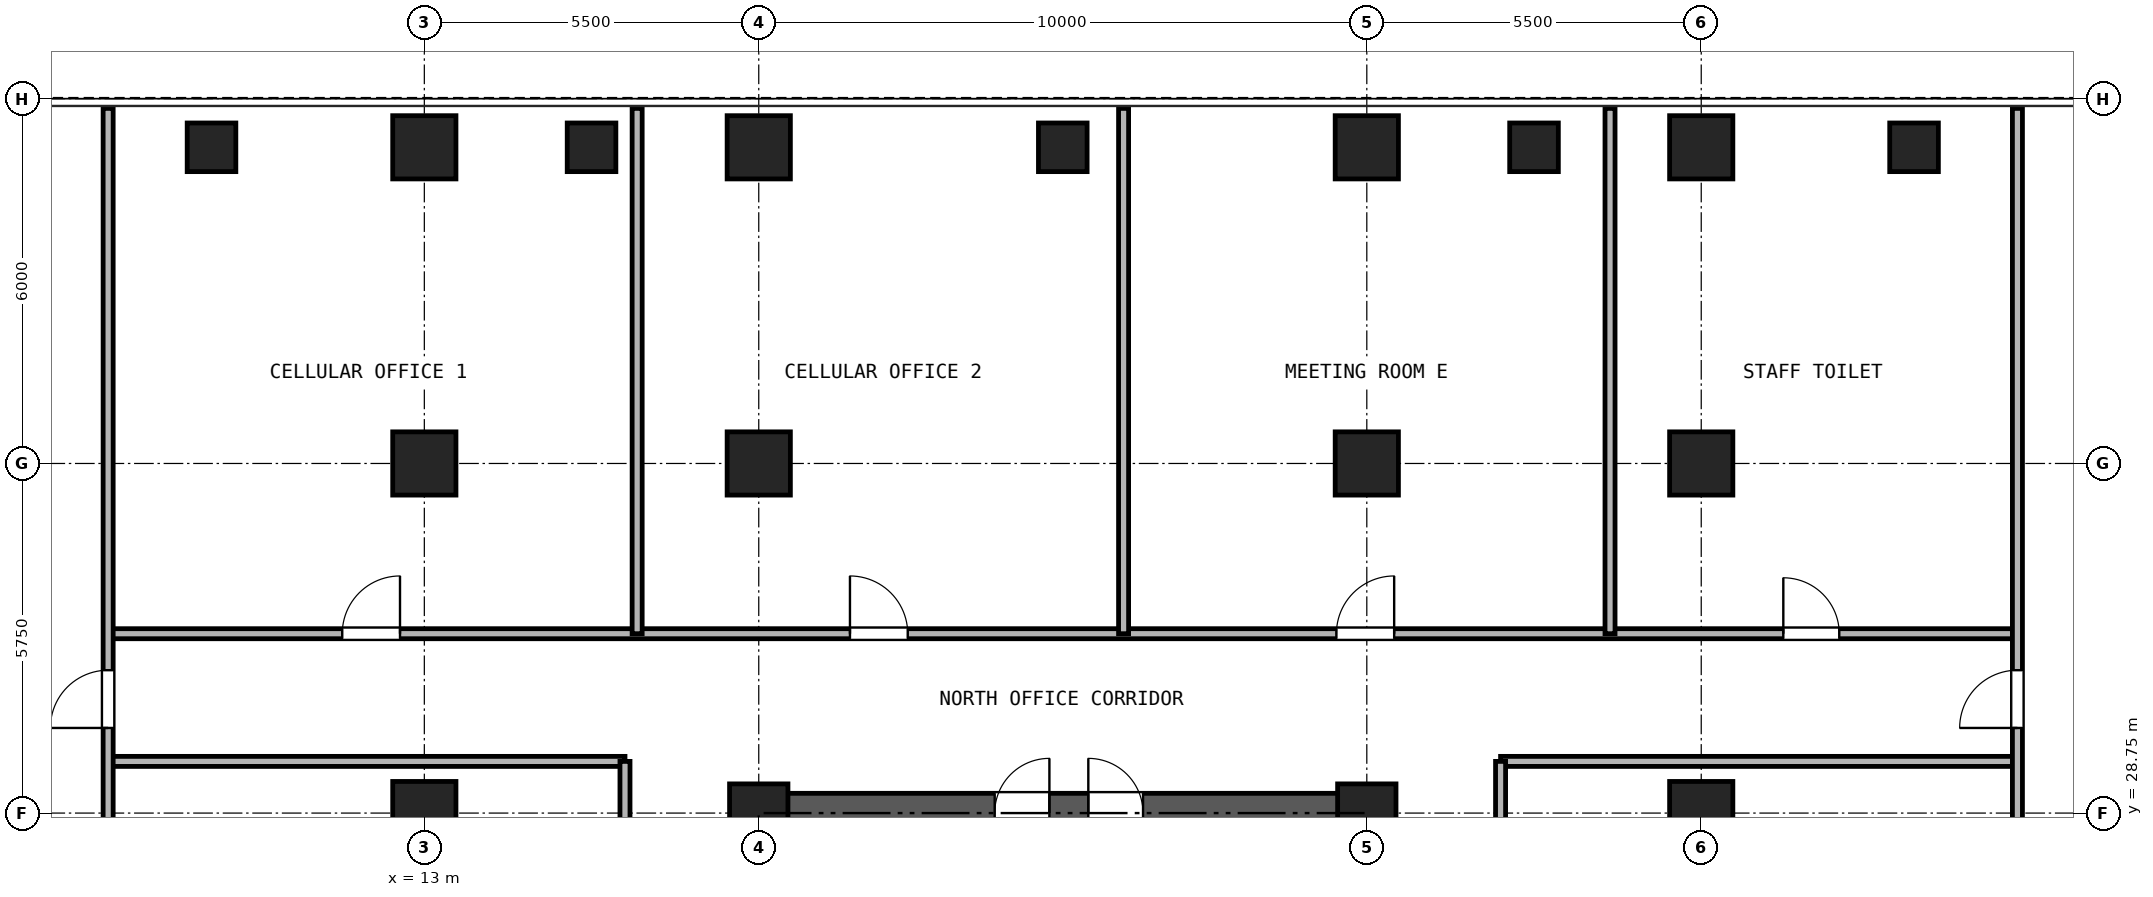
"""IFC4 building model, lengths in metres.
Left out: names, types, materials, properties, quantities, classifications, styles, units other than length and angle.
Written with IfcOpenShell. Run it as: python <this file> out.ifc"""

import sys

from ifc_helpers import new_model, si_unit, direction, frame, frame_2d, origin, origin_2d, place, context, subcontext, project, spatial, rectangle, hollow_rectangle, extrude, source, transform, mapped, element, fill, save


model = new_model("IFC4")
c1 = context("Model", 3, precision=1e-05, world=origin(), true_north=direction((0.0, 1.0)))
c2 = subcontext(c1, "Body", "Model", "MODEL_VIEW")
j1 = project(units=[si_unit("LENGTHUNIT", "METRE"), si_unit("PLANEANGLEUNIT", "RADIAN")], contexts=[c1])
p1 = place(None, origin())
s1 = spatial("IfcSite", under=j1, at=p1, CompositionType="ELEMENT")
p2 = place(p1, origin())
s2 = spatial("IfcBuilding", under=s1, at=p2, CompositionType="ELEMENT")
p3 = place(p2, frame((0.0, 0.0, 69.3)))
s3 = spatial("IfcBuildingStorey", under=s2, at=p3, CompositionType="ELEMENT", Elevation=69.3)
m1 = source(origin(), c2, "Body", "SweptSolid", [
    extrude(hollow_rectangle(XDim=1.04, YDim=1.04, WallThickness=0.065, at=origin_2d()), origin(), (0.0, 0.0, 1.0), 3.32),
])
for number, where, z_axis, x_axis in (
    (1, (13.0, 39.7, 0.0), (0.0, 0.0, 1.0), (1.0, 0.0, 0.0)),
    (2, (18.5, 39.7, 0.0), (0.0, 0.0, 1.0), (1.0, 0.0, 0.0)),
    (3, (28.5, 39.7, 0.0), (0.0, 0.0, 1.0), (1.0, 0.0, 0.0)),
    (4, (34.0, 39.7, 0.0), (0.0, 0.0, 1.0), (1.0, 0.0, 0.0)),
    (5, (13.0, 28.75, 0.0), (0.0, 0.0, 1.0), (1.0, 0.0, 0.0)),
    (6, (13.0, 34.5, 0.0), (0.0, 0.0, 1.0), (1.0, 0.0, 0.0)),
):
    element("IfcColumn", number, at=place(p3, frame(where, z_axis=z_axis, x_axis=x_axis)), inside=s3, PredefinedType="COLUMN", context=c2, shape_type="MappedRepresentation", body=[
        mapped(m1, transform((0.0, 0.0, 0.0), x_axis=(1.0, 0.0, 0.0), y_axis=(0.0, 1.0, 0.0), z_axis=(0.0, 0.0, 1.0), scale=1.0)),
    ])
m2 = source(origin(), c2, "Body", "SweptSolid", [
    extrude(hollow_rectangle(XDim=0.96, YDim=0.96, WallThickness=0.06, at=origin_2d()), origin(), (0.0, 0.0, 1.0), 3.32),
])
p4 = place(p3, frame((18.5, 28.75, 0.0), z_axis=(0.0, 0.0, 1.0), x_axis=(1.0, 0.0, 0.0)))
e7 = element("IfcColumn", 7, at=p4, inside=s3, PredefinedType="COLUMN", context=c2, shape_type="MappedRepresentation", body=[
    mapped(m2, transform((0.0, 0.0, 0.0), x_axis=(1.0, 0.0, 0.0), y_axis=(0.0, 1.0, 0.0), z_axis=(0.0, 0.0, 1.0), scale=1.0)),
])
p5 = place(p3, frame((18.5, 34.5, 0.0), z_axis=(0.0, 0.0, 1.0), x_axis=(1.0, 0.0, 0.0)))
e8 = element("IfcColumn", 8, at=p5, inside=s3, PredefinedType="COLUMN", context=c2, shape_type="MappedRepresentation", body=[
    mapped(m1, transform((0.0, 0.0, 0.0), x_axis=(1.0, 0.0, 0.0), y_axis=(0.0, 1.0, 0.0), z_axis=(0.0, 0.0, 1.0), scale=1.0)),
])
p6 = place(p3, frame((28.5, 28.75, 0.0), z_axis=(0.0, 0.0, 1.0), x_axis=(1.0, 0.0, 0.0)))
e9 = element("IfcColumn", 9, at=p6, inside=s3, PredefinedType="COLUMN", context=c2, shape_type="MappedRepresentation", body=[
    mapped(m2, transform((0.0, 0.0, 0.0), x_axis=(1.0, 0.0, 0.0), y_axis=(0.0, 1.0, 0.0), z_axis=(0.0, 0.0, 1.0), scale=1.0)),
])
for number, where, z_axis, x_axis in (
    (10, (28.5, 34.5, 0.0), (0.0, 0.0, 1.0), (1.0, 0.0, 0.0)),
    (11, (34.0, 28.75, 0.0), (0.0, 0.0, 1.0), (1.0, 0.0, 0.0)),
    (12, (34.0, 34.5, 0.0), (0.0, 0.0, 1.0), (1.0, 0.0, 0.0)),
):
    element("IfcColumn", number, at=place(p3, frame(where, z_axis=z_axis, x_axis=x_axis)), inside=s3, PredefinedType="COLUMN", context=c2, shape_type="MappedRepresentation", body=[
        mapped(m1, transform((0.0, 0.0, 0.0), x_axis=(1.0, 0.0, 0.0), y_axis=(0.0, 1.0, 0.0), z_axis=(0.0, 0.0, 1.0), scale=1.0)),
    ])
m3 = source(origin(), c2, "Body", "SweptSolid", [
    extrude(hollow_rectangle(XDim=0.8, YDim=0.8, WallThickness=0.045, at=origin_2d()), origin(), (0.0, 0.0, 1.0), 3.32),
])
for number, where, z_axis, x_axis in (
    (13, (9.5, 39.7, 0.0), (0.0, 0.0, 1.0), (1.0, 0.0, 0.0)),
    (14, (15.75, 39.7, 0.0), (0.0, 0.0, 1.0), (1.0, 0.0, 0.0)),
    (15, (23.5, 39.7, 0.0), (0.0, 0.0, 1.0), (1.0, 0.0, 0.0)),
    (16, (31.25, 39.7, 0.0), (0.0, 0.0, 1.0), (1.0, 0.0, 0.0)),
    (17, (37.5, 39.7, 0.0), (0.0, 0.0, 1.0), (1.0, 0.0, 0.0)),
):
    element("IfcColumn", number, at=place(p3, frame(where, z_axis=z_axis, x_axis=x_axis)), inside=s3, PredefinedType="COLUMN", context=c2, shape_type="MappedRepresentation", body=[
        mapped(m3, transform((0.0, 0.0, 0.0), x_axis=(1.0, 0.0, 0.0), y_axis=(0.0, 1.0, 0.0), z_axis=(0.0, 0.0, 1.0), scale=1.0)),
    ])
p7 = place(p3, frame((18.175, 28.75, 0.0), z_axis=(0.0, 0.0, 1.0), x_axis=(1.0, 0.0, 0.0)))
e18 = element("IfcWall", 18, at=p7, inside=s3, PredefinedType="SHEAR", context=c2, shape_type="SweptSolid", body=[
    extrude(rectangle(XDim=10.65, YDim=0.65, at=frame_2d((5.325, 0.0))), origin(), (0.0, 0.0, 1.0), 3.32),
])
p8 = place(p7, frame((4.205, 0.0, 0.0)))
e19 = element("IfcOpeningElement", 19, at=p8, cuts=e18, PredefinedType="OPENING", context=c2, shape_type="SweptSolid", body=[
    extrude(rectangle(XDim=0.9, YDim=2.05, at=frame_2d((0.45, 1.025))), frame((0.0, 0.335, 0.0), z_axis=(0.0, -1.0, 0.0), x_axis=(1.0, 0.0, 0.0)), (0.0, 0.0, 1.0), 0.67),
])
p9 = place(p7, frame((5.745, 0.0, 0.0)))
e20 = element("IfcOpeningElement", 20, at=p9, cuts=e18, PredefinedType="OPENING", context=c2, shape_type="SweptSolid", body=[
    extrude(rectangle(XDim=0.9, YDim=2.05, at=frame_2d((0.45, 1.025))), frame((0.0, 0.335, 0.0), z_axis=(0.0, -1.0, 0.0), x_axis=(1.0, 0.0, 0.0)), (0.0, 0.0, 1.0), 0.67),
])
p10 = place(p3, frame((7.8, 31.7, 0.0), z_axis=(0.0, 0.0, 1.0), x_axis=(1.0, 0.0, 0.0)))
e21 = element("IfcWall", 21, at=p10, inside=s3, PredefinedType="PARTITIONING", context=c2, shape_type="SweptSolid", body=[
    extrude(rectangle(XDim=31.4, YDim=0.165, at=frame_2d((15.7, 0.0))), origin(), (0.0, 0.0, 1.0), 2.898),
])
p11 = place(p10, frame((3.85, 0.0, 0.0)))
e22 = element("IfcOpeningElement", 22, at=p11, cuts=e21, PredefinedType="OPENING", context=c2, shape_type="SweptSolid", body=[
    extrude(rectangle(XDim=0.95, YDim=2.15, at=frame_2d((0.475, 1.075))), frame((0.0, 0.093, 0.0), z_axis=(0.0, -1.0, 0.0), x_axis=(1.0, 0.0, 0.0)), (0.0, 0.0, 1.0), 0.185),
])
p12 = place(p10, frame((12.2, 0.0, 0.0)))
e23 = element("IfcOpeningElement", 23, at=p12, cuts=e21, PredefinedType="OPENING", context=c2, shape_type="SweptSolid", body=[
    extrude(rectangle(XDim=0.95, YDim=2.15, at=frame_2d((0.475, 1.075))), frame((0.0, 0.093, 0.0), z_axis=(0.0, -1.0, 0.0), x_axis=(1.0, 0.0, 0.0)), (0.0, 0.0, 1.0), 0.185),
])
p13 = place(p10, frame((20.2, 0.0, 0.0)))
e24 = element("IfcOpeningElement", 24, at=p13, cuts=e21, PredefinedType="OPENING", context=c2, shape_type="SweptSolid", body=[
    extrude(rectangle(XDim=0.95, YDim=2.15, at=frame_2d((0.475, 1.075))), frame((0.0, 0.093, 0.0), z_axis=(0.0, -1.0, 0.0), x_axis=(1.0, 0.0, 0.0)), (0.0, 0.0, 1.0), 0.185),
])
p14 = place(p10, frame((27.55, 0.0, 0.0)))
e25 = element("IfcOpeningElement", 25, at=p14, cuts=e21, PredefinedType="OPENING", context=c2, shape_type="SweptSolid", body=[
    extrude(rectangle(XDim=0.92, YDim=2.1, at=frame_2d((0.46, 1.05))), frame((0.0, 0.093, 0.0), z_axis=(0.0, -1.0, 0.0), x_axis=(1.0, 0.0, 0.0)), (0.0, 0.0, 1.0), 0.185),
])
for number, where, z_axis, x_axis in (
    (26, (7.8, 29.6, 0.0), (0.0, 0.0, 1.0), (1.0, 0.0, 0.0)),
    (27, (30.7, 29.6, 0.0), (0.0, 0.0, 1.0), (1.0, 0.0, 0.0)),
):
    element("IfcWall", number, at=place(p3, frame(where, z_axis=z_axis, x_axis=x_axis)), inside=s3, PredefinedType="PARTITIONING", context=c2, shape_type="SweptSolid", body=[
        extrude(rectangle(XDim=8.5, YDim=0.165, at=frame_2d((4.25, 0.0))), origin(), (0.0, 0.0, 1.0), 3.32),
    ])
p15 = place(p3, frame((16.3, 10.7, 0.0), z_axis=(0.0, 0.0, 1.0), x_axis=(0.0, 1.0, 0.0)))
e28 = element("IfcWall", 28, at=p15, inside=s3, PredefinedType="PARTITIONING", context=c2, shape_type="SweptSolid", body=[
    extrude(rectangle(XDim=18.9, YDim=0.165, at=frame_2d((9.45, 0.0))), origin(), (0.0, 0.0, 1.0), 3.32),
])
p16 = place(p15, frame((5.611, 0.0, 0.0)))
e29 = element("IfcOpeningElement", 29, at=p16, cuts=e28, PredefinedType="OPENING", context=c2, shape_type="SweptSolid", body=[
    extrude(rectangle(XDim=0.95, YDim=2.15, at=frame_2d((0.475, 1.075))), frame((0.0, 0.093, 0.0), z_axis=(0.0, -1.0, 0.0), x_axis=(1.0, 0.0, 0.0)), (0.0, 0.0, 1.0), 0.185),
])
p17 = place(p15, frame((15.061, 0.0, 0.0)))
e30 = element("IfcOpeningElement", 30, at=p17, cuts=e28, PredefinedType="OPENING", context=c2, shape_type="SweptSolid", body=[
    extrude(rectangle(XDim=0.95, YDim=2.15, at=frame_2d((0.475, 1.075))), frame((0.0, 0.093, 0.0), z_axis=(0.0, -1.0, 0.0), x_axis=(1.0, 0.0, 0.0)), (0.0, 0.0, 1.0), 0.185),
])
p18 = place(p3, frame((30.7, 10.7, 0.0), z_axis=(0.0, 0.0, 1.0), x_axis=(0.0, 1.0, 0.0)))
e31 = element("IfcWall", 31, at=p18, inside=s3, PredefinedType="PARTITIONING", context=c2, shape_type="SweptSolid", body=[
    extrude(rectangle(XDim=18.9, YDim=0.165, at=frame_2d((9.45, 0.0))), origin(), (0.0, 0.0, 1.0), 3.32),
])
p19 = place(p18, frame((8.95, 0.0, 0.0)))
e32 = element("IfcOpeningElement", 32, at=p19, cuts=e31, PredefinedType="OPENING", context=c2, shape_type="SweptSolid", body=[
    extrude(rectangle(XDim=0.95, YDim=2.15, at=frame_2d((0.475, 1.075))), frame((0.0, 0.093, 0.0), z_axis=(0.0, -1.0, 0.0), x_axis=(1.0, 0.0, 0.0)), (0.0, 0.0, 1.0), 0.185),
])
p20 = place(p3, frame((7.8, 0.16, 0.0), z_axis=(0.0, 0.0, 1.0), x_axis=(0.0, 1.0, 0.0)))
e33 = element("IfcWall", 33, at=p20, inside=s3, PredefinedType="PARTITIONING", context=c2, shape_type="SweptSolid", body=[
    extrude(rectangle(XDim=40.18, YDim=0.165, at=frame_2d((20.09, 0.0))), origin(), (0.0, 0.0, 1.0), 3.32),
])
p21 = place(p20, frame((8.99, 0.0, 0.0)))
e34 = element("IfcOpeningElement", 34, at=p21, cuts=e33, PredefinedType="OPENING", context=c2, shape_type="SweptSolid", body=[
    extrude(rectangle(XDim=0.95, YDim=2.15, at=frame_2d((0.475, 1.075))), frame((0.0, 0.093, 0.0), z_axis=(0.0, -1.0, 0.0), x_axis=(1.0, 0.0, 0.0)), (0.0, 0.0, 1.0), 0.185),
])
p22 = place(p20, frame((29.99, 0.0, 0.0)))
e35 = element("IfcOpeningElement", 35, at=p22, cuts=e33, PredefinedType="OPENING", context=c2, shape_type="SweptSolid", body=[
    extrude(rectangle(XDim=0.95, YDim=2.15, at=frame_2d((0.475, 1.075))), frame((0.0, 0.093, 0.0), z_axis=(0.0, -1.0, 0.0), x_axis=(1.0, 0.0, 0.0)), (0.0, 0.0, 1.0), 0.185),
])
p23 = place(p3, frame((39.2, 0.16, 0.0), z_axis=(0.0, 0.0, 1.0), x_axis=(0.0, 1.0, 0.0)))
e36 = element("IfcWall", 36, at=p23, inside=s3, PredefinedType="PARTITIONING", context=c2, shape_type="SweptSolid", body=[
    extrude(rectangle(XDim=40.18, YDim=0.165, at=frame_2d((20.09, 0.0))), origin(), (0.0, 0.0, 1.0), 3.32),
])
p24 = place(p23, frame((8.99, 0.0, 0.0)))
e37 = element("IfcOpeningElement", 37, at=p24, cuts=e36, PredefinedType="OPENING", context=c2, shape_type="SweptSolid", body=[
    extrude(rectangle(XDim=0.95, YDim=2.15, at=frame_2d((0.475, 1.075))), frame((0.0, 0.093, 0.0), z_axis=(0.0, -1.0, 0.0), x_axis=(1.0, 0.0, 0.0)), (0.0, 0.0, 1.0), 0.185),
])
p25 = place(p23, frame((29.99, 0.0, 0.0)))
e38 = element("IfcOpeningElement", 38, at=p25, cuts=e36, PredefinedType="OPENING", context=c2, shape_type="SweptSolid", body=[
    extrude(rectangle(XDim=0.95, YDim=2.15, at=frame_2d((0.475, 1.075))), frame((0.0, 0.093, 0.0), z_axis=(0.0, -1.0, 0.0), x_axis=(1.0, 0.0, 0.0)), (0.0, 0.0, 1.0), 0.185),
])
for number, where, z_axis, x_axis in (
    (39, (16.5, 31.7, 0.0), (0.0, 0.0, 1.0), (0.0, 1.0, 0.0)),
    (40, (24.5, 31.7, 0.0), (0.0, 0.0, 1.0), (0.0, 1.0, 0.0)),
    (41, (32.5, 31.7, 0.0), (0.0, 0.0, 1.0), (0.0, 1.0, 0.0)),
):
    element("IfcWall", number, at=place(p3, frame(where, z_axis=z_axis, x_axis=x_axis)), inside=s3, PredefinedType="PARTITIONING", context=c2, shape_type="SweptSolid", body=[
        extrude(rectangle(XDim=8.64, YDim=0.165, at=frame_2d((4.32, 0.0))), origin(), (0.0, 0.0, 1.0), 3.32),
    ])
p26 = place(p8, origin())
e42 = element("IfcDoor", 42, at=p26, inside=s3, OperationType="SINGLE_SWING_RIGHT", PredefinedType="DOOR", context=c2, shape_type="SweptSolid", body=[
    extrude(rectangle(XDim=0.9, YDim=2.05, at=frame_2d((0.45, 1.025))), frame((0.0, 0.025, 0.0), z_axis=(0.0, -1.0, 0.0), x_axis=(1.0, 0.0, 0.0)), (0.0, 0.0, 1.0), 0.05),
])
fill(e19, e42)
p27 = place(p9, origin())
e43 = element("IfcDoor", 43, at=p27, inside=s3, OperationType="SINGLE_SWING_LEFT", PredefinedType="DOOR", context=c2, shape_type="SweptSolid", body=[
    extrude(rectangle(XDim=0.9, YDim=2.05, at=frame_2d((0.45, 1.025))), frame((0.0, 0.025, 0.0), z_axis=(0.0, -1.0, 0.0), x_axis=(1.0, 0.0, 0.0)), (0.0, 0.0, 1.0), 0.05),
])
fill(e20, e43)
p28 = place(p11, origin())
e44 = element("IfcDoor", 44, at=p28, inside=s3, OperationType="SINGLE_SWING_RIGHT", PredefinedType="DOOR", context=c2, shape_type="SweptSolid", body=[
    extrude(rectangle(XDim=0.95, YDim=2.15, at=frame_2d((0.475, 1.075))), frame((0.0, 0.025, 0.0), z_axis=(0.0, -1.0, 0.0), x_axis=(1.0, 0.0, 0.0)), (0.0, 0.0, 1.0), 0.05),
])
fill(e22, e44)
p29 = place(p12, origin())
e45 = element("IfcDoor", 45, at=p29, inside=s3, OperationType="SINGLE_SWING_LEFT", PredefinedType="DOOR", context=c2, shape_type="SweptSolid", body=[
    extrude(rectangle(XDim=0.95, YDim=2.15, at=frame_2d((0.475, 1.075))), frame((0.0, 0.025, 0.0), z_axis=(0.0, -1.0, 0.0), x_axis=(1.0, 0.0, 0.0)), (0.0, 0.0, 1.0), 0.05),
])
fill(e23, e45)
p30 = place(p13, origin())
e46 = element("IfcDoor", 46, at=p30, inside=s3, OperationType="SINGLE_SWING_RIGHT", PredefinedType="DOOR", context=c2, shape_type="SweptSolid", body=[
    extrude(rectangle(XDim=0.95, YDim=2.15, at=frame_2d((0.475, 1.075))), frame((0.0, 0.025, 0.0), z_axis=(0.0, -1.0, 0.0), x_axis=(1.0, 0.0, 0.0)), (0.0, 0.0, 1.0), 0.05),
])
fill(e24, e46)
p31 = place(p14, origin())
e47 = element("IfcDoor", 47, at=p31, inside=s3, OperationType="SINGLE_SWING_LEFT", PredefinedType="DOOR", context=c2, shape_type="SweptSolid", body=[
    extrude(rectangle(XDim=0.92, YDim=2.1, at=frame_2d((0.46, 1.05))), frame((0.0, 0.025, 0.0), z_axis=(0.0, -1.0, 0.0), x_axis=(1.0, 0.0, 0.0)), (0.0, 0.0, 1.0), 0.05),
])
fill(e25, e47)
p32 = place(p22, frame((0.95, 0.0, 0.0), z_axis=(0.0, 0.0, 1.0), x_axis=(-1.0, 0.0, 0.0)))
e48 = element("IfcDoor", 48, at=p32, inside=s3, OperationType="SINGLE_SWING_LEFT", PredefinedType="DOOR", context=c2, shape_type="SweptSolid", body=[
    extrude(rectangle(XDim=0.95, YDim=2.15, at=frame_2d((0.475, 1.075))), frame((0.0, 0.025, 0.0), z_axis=(0.0, -1.0, 0.0), x_axis=(1.0, 0.0, 0.0)), (0.0, 0.0, 1.0), 0.05),
])
fill(e35, e48)
p33 = place(p25, origin())
e49 = element("IfcDoor", 49, at=p33, inside=s3, OperationType="SINGLE_SWING_LEFT", PredefinedType="DOOR", context=c2, shape_type="SweptSolid", body=[
    extrude(rectangle(XDim=0.95, YDim=2.15, at=frame_2d((0.475, 1.075))), frame((0.0, 0.025, 0.0), z_axis=(0.0, -1.0, 0.0), x_axis=(1.0, 0.0, 0.0)), (0.0, 0.0, 1.0), 0.05),
])
fill(e38, e49)
save(model, sys.argv[1])
